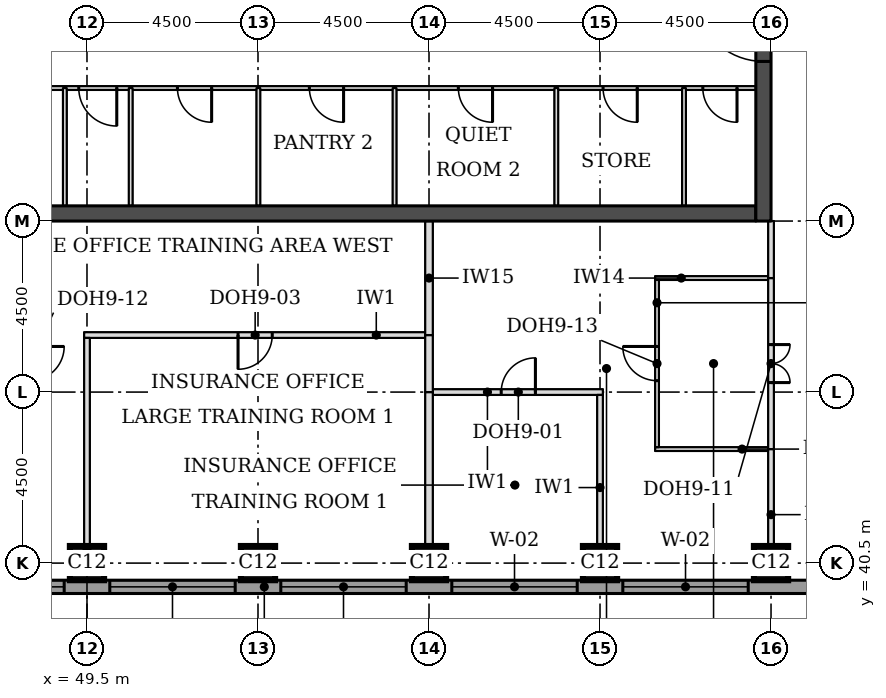
"""IFC4 building model, lengths in metres.
Left out: names, types, materials, properties, quantities, classifications, styles, units other than length and angle.
Written with IfcOpenShell. Run it as: python <this file> out.ifc"""

import sys

from ifc_helpers import new_model, si_unit, direction, frame, frame_2d, origin, origin_2d, place, context, subcontext, project, spatial, rectangle, extrude, element, fill, save


model = new_model("IFC4")
c1 = context("Model", 3, precision=1e-05, world=origin(), true_north=direction((0.0, 1.0)))
c2 = subcontext(c1, "Body", "Model", "MODEL_VIEW")
j1 = project(units=[si_unit("LENGTHUNIT", "METRE"), si_unit("PLANEANGLEUNIT", "RADIAN")], contexts=[c1])
p1 = place(None, origin())
s1 = spatial("IfcSite", under=j1, at=p1, CompositionType="ELEMENT")
p2 = place(p1, origin())
s2 = spatial("IfcBuilding", under=s1, at=p2, CompositionType="ELEMENT")
p3 = place(p2, frame((0.0, 0.0, 211.9)))
s3 = spatial("IfcBuildingStorey", under=s2, at=p3, CompositionType="ELEMENT", Elevation=211.9)
for number, where, z_axis, x_axis in (
    (1, (49.5, 40.5, 0.0), (0.0, 0.0, 1.0), (1.0, 0.0, 0.0)),
    (2, (54.0, 40.5, 0.0), (0.0, 0.0, 1.0), (1.0, 0.0, 0.0)),
    (3, (58.5, 40.5, 0.0), (0.0, 0.0, 1.0), (1.0, 0.0, 0.0)),
    (4, (63.0, 40.5, 0.0), (0.0, 0.0, 1.0), (1.0, 0.0, 0.0)),
    (5, (67.5, 40.5, 0.0), (0.0, 0.0, 1.0), (1.0, 0.0, 0.0)),
):
    element("IfcColumn", number, at=place(p3, frame(where, z_axis=z_axis, x_axis=x_axis)), inside=s3, PredefinedType="COLUMN", context=c2, shape_type="SweptSolid", body=[
        extrude(rectangle(XDim=0.9, YDim=0.9, at=origin_2d()), origin(), (0.0, 0.0, 1.0), 3.7),
    ])
p4 = place(p3, frame((45.4, 49.7, 0.0), z_axis=(0.0, 0.0, 1.0), x_axis=(1.0, 0.0, 0.0)))
e6 = element("IfcWall", 6, at=p4, inside=s3, PredefinedType="SHEAR", context=c2, shape_type="SweptSolid", body=[
    extrude(rectangle(XDim=21.7, YDim=0.4, at=frame_2d((10.85, 0.0))), origin(), (0.0, 0.0, 1.0), 3.7),
])
p5 = place(p3, frame((67.3, 49.5, 0.0), z_axis=(0.0, 0.0, 1.0), x_axis=(0.0, 1.0, 0.0)))
e7 = element("IfcWall", 7, at=p5, inside=s3, PredefinedType="SHEAR", context=c2, shape_type="SweptSolid", body=[
    extrude(rectangle(XDim=22.5, YDim=0.4, at=frame_2d((11.25, 0.0))), origin(), (0.0, 0.0, 1.0), 3.7),
])
p6 = place(p5, frame((4.2, 0.0, 0.0)))
e8 = element("IfcOpeningElement", 8, at=p6, cuts=e7, PredefinedType="OPENING", context=c2, shape_type="SweptSolid", body=[
    extrude(rectangle(XDim=1.8, YDim=2.1, at=frame_2d((0.9, 1.05))), frame((0.0, 0.21, 0.0), z_axis=(0.0, -1.0, 0.0), x_axis=(1.0, 0.0, 0.0)), (0.0, 0.0, 1.0), 0.42),
])
p7 = place(p5, frame((6.9, 0.0, 0.0)))
e9 = element("IfcOpeningElement", 9, at=p7, cuts=e7, PredefinedType="OPENING", context=c2, shape_type="SweptSolid", body=[
    extrude(rectangle(XDim=1.1, YDim=2.1, at=frame_2d((0.55, 1.05))), frame((0.0, 0.21, 0.0), z_axis=(0.0, -1.0, 0.0), x_axis=(1.0, 0.0, 0.0)), (0.0, 0.0, 1.0), 0.42),
])
p8 = place(p5, frame((13.6, 0.0, 0.0)))
e10 = element("IfcOpeningElement", 10, at=p8, cuts=e7, PredefinedType="OPENING", context=c2, shape_type="SweptSolid", body=[
    extrude(rectangle(XDim=1.1, YDim=2.1, at=frame_2d((0.55, 1.05))), frame((0.0, 0.21, 0.0), z_axis=(0.0, -1.0, 0.0), x_axis=(1.0, 0.0, 0.0)), (0.0, 0.0, 1.0), 0.42),
])
p9 = place(p5, frame((16.5, 0.0, 0.0)))
e11 = element("IfcOpeningElement", 11, at=p9, cuts=e7, PredefinedType="OPENING", context=c2, shape_type="SweptSolid", body=[
    extrude(rectangle(XDim=1.8, YDim=2.1, at=frame_2d((0.9, 1.05))), frame((0.0, 0.21, 0.0), z_axis=(0.0, -1.0, 0.0), x_axis=(1.0, 0.0, 0.0)), (0.0, 0.0, 1.0), 0.42),
])
p10 = place(p3, frame((36.0, 39.875, 0.0), z_axis=(0.0, 0.0, 1.0), x_axis=(1.0, 0.0, 0.0)))
e12 = element("IfcWall", 12, at=p10, inside=s3, PredefinedType="STANDARD", context=c2, shape_type="SweptSolid", body=[
    extrude(rectangle(XDim=36.331, YDim=0.35, at=frame_2d((18.166, 0.0))), origin(), (0.0, 0.0, 1.0), 3.525),
])
p11 = place(p10, frame((5.1, 0.0, 0.9)))
e13 = element("IfcOpeningElement", 13, at=p11, cuts=e12, PredefinedType="OPENING", context=c2, shape_type="SweptSolid", body=[
    extrude(rectangle(XDim=3.3, YDim=1.9, at=frame_2d((1.65, 0.95))), frame((0.0, 0.185, 0.0), z_axis=(0.0, -1.0, 0.0), x_axis=(1.0, 0.0, 0.0)), (0.0, 0.0, 1.0), 0.37),
])
p12 = place(p10, frame((9.6, 0.0, 0.9)))
e14 = element("IfcOpeningElement", 14, at=p12, cuts=e12, PredefinedType="OPENING", context=c2, shape_type="SweptSolid", body=[
    extrude(rectangle(XDim=3.3, YDim=1.9, at=frame_2d((1.65, 0.95))), frame((0.0, 0.185, 0.0), z_axis=(0.0, -1.0, 0.0), x_axis=(1.0, 0.0, 0.0)), (0.0, 0.0, 1.0), 0.37),
])
p13 = place(p10, frame((14.1, 0.0, 0.9)))
e15 = element("IfcOpeningElement", 15, at=p13, cuts=e12, PredefinedType="OPENING", context=c2, shape_type="SweptSolid", body=[
    extrude(rectangle(XDim=3.3, YDim=1.9, at=frame_2d((1.65, 0.95))), frame((0.0, 0.185, 0.0), z_axis=(0.0, -1.0, 0.0), x_axis=(1.0, 0.0, 0.0)), (0.0, 0.0, 1.0), 0.37),
])
p14 = place(p10, frame((18.6, 0.0, 0.9)))
e16 = element("IfcOpeningElement", 16, at=p14, cuts=e12, PredefinedType="OPENING", context=c2, shape_type="SweptSolid", body=[
    extrude(rectangle(XDim=3.3, YDim=1.9, at=frame_2d((1.65, 0.95))), frame((0.0, 0.185, 0.0), z_axis=(0.0, -1.0, 0.0), x_axis=(1.0, 0.0, 0.0)), (0.0, 0.0, 1.0), 0.37),
])
p15 = place(p10, frame((23.1, 0.0, 0.9)))
e17 = element("IfcOpeningElement", 17, at=p15, cuts=e12, PredefinedType="OPENING", context=c2, shape_type="SweptSolid", body=[
    extrude(rectangle(XDim=3.3, YDim=1.9, at=frame_2d((1.65, 0.95))), frame((0.0, 0.185, 0.0), z_axis=(0.0, -1.0, 0.0), x_axis=(1.0, 0.0, 0.0)), (0.0, 0.0, 1.0), 0.37),
])
p16 = place(p10, frame((27.6, 0.0, 0.9)))
e18 = element("IfcOpeningElement", 18, at=p16, cuts=e12, PredefinedType="OPENING", context=c2, shape_type="SweptSolid", body=[
    extrude(rectangle(XDim=3.3, YDim=1.9, at=frame_2d((1.65, 0.95))), frame((0.0, 0.185, 0.0), z_axis=(0.0, -1.0, 0.0), x_axis=(1.0, 0.0, 0.0)), (0.0, 0.0, 1.0), 0.37),
])
p17 = place(p3, frame((64.45, 43.5, 0.0), z_axis=(0.0, 0.0, 1.0), x_axis=(1.0, 0.0, 0.0)))
e19 = element("IfcWall", 19, at=p17, inside=s3, PredefinedType="PARTITIONING", context=c2, shape_type="SweptSolid", body=[
    extrude(rectangle(XDim=2.975, YDim=0.1, at=frame_2d((1.488, 0.0))), origin(), (0.0, 0.0, 1.0), 3.55),
])
p18 = place(p3, frame((58.6, 45.0, 0.0), z_axis=(0.0, 0.0, 1.0), x_axis=(1.0, 0.0, 0.0)))
e20 = element("IfcWall", 20, at=p18, inside=s3, PredefinedType="PARTITIONING", context=c2, shape_type="SweptSolid", body=[
    extrude(rectangle(XDim=4.475, YDim=0.15, at=frame_2d((2.237, 0.0))), origin(), (0.0, 0.0, 1.0), 3.55),
])
p19 = place(p18, frame((1.8, 0.0, 0.0)))
e21 = element("IfcOpeningElement", 21, at=p19, cuts=e20, PredefinedType="OPENING", context=c2, shape_type="SweptSolid", body=[
    extrude(rectangle(XDim=0.9, YDim=2.1, at=frame_2d((0.45, 1.05))), frame((0.0, 0.085, 0.0), z_axis=(0.0, -1.0, 0.0), x_axis=(1.0, 0.0, 0.0)), (0.0, 0.0, 1.0), 0.17),
])
p20 = place(p3, frame((49.425, 46.5, 0.0), z_axis=(0.0, 0.0, 1.0), x_axis=(1.0, 0.0, 0.0)))
e22 = element("IfcWall", 22, at=p20, inside=s3, PredefinedType="PARTITIONING", context=c2, shape_type="SweptSolid", body=[
    extrude(rectangle(XDim=8.975, YDim=0.15, at=frame_2d((4.487, 0.0))), origin(), (0.0, 0.0, 1.0), 3.55),
])
p21 = place(p20, frame((4.05, 0.0, 0.0)))
e23 = element("IfcOpeningElement", 23, at=p21, cuts=e22, PredefinedType="OPENING", context=c2, shape_type="SweptSolid", body=[
    extrude(rectangle(XDim=0.9, YDim=2.1, at=frame_2d((0.45, 1.05))), frame((0.0, 0.085, 0.0), z_axis=(0.0, -1.0, 0.0), x_axis=(1.0, 0.0, 0.0)), (0.0, 0.0, 1.0), 0.17),
])
p22 = place(p3, frame((64.45, 48.0, 0.0), z_axis=(0.0, 0.0, 1.0), x_axis=(1.0, 0.0, 0.0)))
e24 = element("IfcWall", 24, at=p22, inside=s3, PredefinedType="PARTITIONING", context=c2, shape_type="SweptSolid", body=[
    extrude(rectangle(XDim=2.975, YDim=0.1, at=frame_2d((1.488, 0.0))), origin(), (0.0, 0.0, 1.0), 3.55),
])
p23 = place(p3, frame((49.5, 40.05, 0.0), z_axis=(0.0, 0.0, 1.0), x_axis=(0.0, 1.0, 0.0)))
e25 = element("IfcWall", 25, at=p23, inside=s3, PredefinedType="PARTITIONING", context=c2, shape_type="SweptSolid", body=[
    extrude(rectangle(XDim=6.375, YDim=0.15, at=frame_2d((3.188, 0.0))), origin(), (0.0, 0.0, 1.0), 3.55),
])
p24 = place(p3, frame((58.5, 40.05, 0.0), z_axis=(0.0, 0.0, 1.0), x_axis=(0.0, 1.0, 0.0)))
e26 = element("IfcWall", 26, at=p24, inside=s3, PredefinedType="PARTITIONING", context=c2, shape_type="SweptSolid", body=[
    extrude(rectangle(XDim=4.95, YDim=0.2, at=frame_2d((2.475, 0.0))), origin(), (0.0, 0.0, 1.0), 3.55),
])
p25 = place(p3, frame((63.0, 40.05, 0.0), z_axis=(0.0, 0.0, 1.0), x_axis=(0.0, 1.0, 0.0)))
e27 = element("IfcWall", 27, at=p25, inside=s3, PredefinedType="PARTITIONING", context=c2, shape_type="SweptSolid", body=[
    extrude(rectangle(XDim=4.875, YDim=0.15, at=frame_2d((2.438, 0.0))), origin(), (0.0, 0.0, 1.0), 3.55),
])
p26 = place(p3, frame((67.5, 40.05, 0.0), z_axis=(0.0, 0.0, 1.0), x_axis=(0.0, 1.0, 0.0)))
e28 = element("IfcWall", 28, at=p26, inside=s3, PredefinedType="PARTITIONING", context=c2, shape_type="SweptSolid", body=[
    extrude(rectangle(XDim=3.45, YDim=0.15, at=frame_2d((1.725, 0.0))), origin(), (0.0, 0.0, 1.0), 3.022),
])
p27 = place(p3, frame((67.5, 43.5, 0.0), z_axis=(0.0, 0.0, 1.0), x_axis=(0.0, 1.0, 0.0)))
e29 = element("IfcWall", 29, at=p27, inside=s3, PredefinedType="PARTITIONING", context=c2, shape_type="SweptSolid", body=[
    extrude(rectangle(XDim=4.5, YDim=0.15, at=frame_2d((2.25, 0.0))), origin(), (0.0, 0.0, 1.0), 3.022),
])
p28 = place(p27, frame((1.75, 0.0, 0.0)))
e30 = element("IfcOpeningElement", 30, at=p28, cuts=e29, PredefinedType="OPENING", context=c2, shape_type="SweptSolid", body=[
    extrude(rectangle(XDim=1.0, YDim=2.1, at=frame_2d((0.5, 1.05))), frame((0.0, 0.085, 0.0), z_axis=(0.0, -1.0, 0.0), x_axis=(1.0, 0.0, 0.0)), (0.0, 0.0, 1.0), 0.17),
])
p29 = place(p3, frame((64.5, 43.55, 0.0), z_axis=(0.0, 0.0, 1.0), x_axis=(0.0, 1.0, 0.0)))
e31 = element("IfcWall", 31, at=p29, inside=s3, PredefinedType="PARTITIONING", context=c2, shape_type="SweptSolid", body=[
    extrude(rectangle(XDim=4.4, YDim=0.1, at=frame_2d((2.2, 0.0))), origin(), (0.0, 0.0, 1.0), 3.55),
])
p30 = place(p29, frame((1.75, 0.0, 0.0)))
e32 = element("IfcOpeningElement", 32, at=p30, cuts=e31, PredefinedType="OPENING", context=c2, shape_type="SweptSolid", body=[
    extrude(rectangle(XDim=0.9, YDim=2.1, at=frame_2d((0.45, 1.05))), frame((0.0, 0.06, 0.0), z_axis=(0.0, -1.0, 0.0), x_axis=(1.0, 0.0, 0.0)), (0.0, 0.0, 1.0), 0.12),
])
p31 = place(p3, frame((58.5, 45.0, 0.0), z_axis=(0.0, 0.0, 1.0), x_axis=(0.0, 1.0, 0.0)))
e33 = element("IfcWall", 33, at=p31, inside=s3, PredefinedType="PARTITIONING", context=c2, shape_type="SweptSolid", body=[
    extrude(rectangle(XDim=1.5, YDim=0.2, at=frame_2d((0.75, 0.0))), origin(), (0.0, 0.0, 1.0), 3.55),
])
p32 = place(p3, frame((58.5, 46.5, 0.0), z_axis=(0.0, 0.0, 1.0), x_axis=(0.0, 1.0, 0.0)))
e34 = element("IfcWall", 34, at=p32, inside=s3, PredefinedType="PARTITIONING", context=c2, shape_type="SweptSolid", body=[
    extrude(rectangle(XDim=3.0, YDim=0.2, at=frame_2d((1.5, 0.0))), origin(), (0.0, 0.0, 1.0), 3.55),
])
p33 = place(p3, frame((67.5, 48.0, 0.0), z_axis=(0.0, 0.0, 1.0), x_axis=(0.0, 1.0, 0.0)))
e35 = element("IfcWall", 35, at=p33, inside=s3, PredefinedType="PARTITIONING", context=c2, shape_type="SweptSolid", body=[
    extrude(rectangle(XDim=1.5, YDim=0.15, at=frame_2d((0.75, 0.0))), origin(), (0.0, 0.0, 1.0), 3.022),
])
p34 = place(p3, frame((45.4, 53.0, 0.0), z_axis=(0.0, 0.0, 1.0), x_axis=(1.0, 0.0, 0.0)))
e36 = element("IfcWall", 36, at=p34, inside=s3, PredefinedType="PARTITIONING", context=c2, shape_type="SweptSolid", body=[
    extrude(rectangle(XDim=21.7, YDim=0.1, at=frame_2d((10.85, 0.0))), origin(), (0.0, 0.0, 1.0), 3.55),
])
p35 = place(p34, frame((20.305, 0.0, 0.0)))
e37 = element("IfcOpeningElement", 37, at=p35, cuts=e36, PredefinedType="OPENING", context=c2, shape_type="SweptSolid", body=[
    extrude(rectangle(XDim=0.9, YDim=2.1, at=frame_2d((0.45, 1.05))), frame((0.0, 0.06, 0.0), z_axis=(0.0, -1.0, 0.0), x_axis=(1.0, 0.0, 0.0)), (0.0, 0.0, 1.0), 0.12),
])
p36 = place(p34, frame((17.68, 0.0, 0.0)))
e38 = element("IfcOpeningElement", 38, at=p36, cuts=e36, PredefinedType="OPENING", context=c2, shape_type="SweptSolid", body=[
    extrude(rectangle(XDim=0.9, YDim=2.1, at=frame_2d((0.45, 1.05))), frame((0.0, 0.06, 0.0), z_axis=(0.0, -1.0, 0.0), x_axis=(1.0, 0.0, 0.0)), (0.0, 0.0, 1.0), 0.12),
])
p37 = place(p34, frame((0.442, 0.0, 0.0)))
e39 = element("IfcOpeningElement", 39, at=p37, cuts=e36, PredefinedType="OPENING", context=c2, shape_type="SweptSolid", body=[
    extrude(rectangle(XDim=0.9, YDim=2.1, at=frame_2d((0.45, 1.05))), frame((0.0, 0.06, 0.0), z_axis=(0.0, -1.0, 0.0), x_axis=(1.0, 0.0, 0.0)), (0.0, 0.0, 1.0), 0.12),
])
p38 = place(p34, frame((2.201, 0.0, 0.0)))
e40 = element("IfcOpeningElement", 40, at=p38, cuts=e36, PredefinedType="OPENING", context=c2, shape_type="SweptSolid", body=[
    extrude(rectangle(XDim=0.9, YDim=2.1, at=frame_2d((0.45, 1.05))), frame((0.0, 0.06, 0.0), z_axis=(0.0, -1.0, 0.0), x_axis=(1.0, 0.0, 0.0)), (0.0, 0.0, 1.0), 0.12),
])
p39 = place(p34, frame((3.884, 0.0, 0.0)))
e41 = element("IfcOpeningElement", 41, at=p39, cuts=e36, PredefinedType="OPENING", context=c2, shape_type="SweptSolid", body=[
    extrude(rectangle(XDim=1.0, YDim=2.1, at=frame_2d((0.5, 1.05))), frame((0.0, 0.06, 0.0), z_axis=(0.0, -1.0, 0.0), x_axis=(1.0, 0.0, 0.0)), (0.0, 0.0, 1.0), 0.12),
])
p40 = place(p34, frame((6.48, 0.0, 0.0)))
e42 = element("IfcOpeningElement", 42, at=p40, cuts=e36, PredefinedType="OPENING", context=c2, shape_type="SweptSolid", body=[
    extrude(rectangle(XDim=0.9, YDim=2.1, at=frame_2d((0.45, 1.05))), frame((0.0, 0.06, 0.0), z_axis=(0.0, -1.0, 0.0), x_axis=(1.0, 0.0, 0.0)), (0.0, 0.0, 1.0), 0.12),
])
p41 = place(p34, frame((9.952, 0.0, 0.0)))
e43 = element("IfcOpeningElement", 43, at=p41, cuts=e36, PredefinedType="OPENING", context=c2, shape_type="SweptSolid", body=[
    extrude(rectangle(XDim=0.9, YDim=2.1, at=frame_2d((0.45, 1.05))), frame((0.0, 0.06, 0.0), z_axis=(0.0, -1.0, 0.0), x_axis=(1.0, 0.0, 0.0)), (0.0, 0.0, 1.0), 0.12),
])
p42 = place(p34, frame((13.872, 0.0, 0.0)))
e44 = element("IfcOpeningElement", 44, at=p42, cuts=e36, PredefinedType="OPENING", context=c2, shape_type="SweptSolid", body=[
    extrude(rectangle(XDim=0.9, YDim=2.1, at=frame_2d((0.45, 1.05))), frame((0.0, 0.06, 0.0), z_axis=(0.0, -1.0, 0.0), x_axis=(1.0, 0.0, 0.0)), (0.0, 0.0, 1.0), 0.12),
])
for number, where, z_axis, x_axis in (
    (45, (48.917, 49.9, 0.0), (0.0, 0.0, 1.0), (0.0, 1.0, 0.0)),
    (46, (50.65, 49.9, 0.0), (0.0, 0.0, 1.0), (0.0, 1.0, 0.0)),
    (47, (54.01, 49.9, 0.0), (0.0, 0.0, 1.0), (0.0, 1.0, 0.0)),
    (48, (57.594, 49.9, 0.0), (0.0, 0.0, 1.0), (0.0, 1.0, 0.0)),
    (49, (61.85, 49.9, 0.0), (0.0, 0.0, 1.0), (0.0, 1.0, 0.0)),
    (50, (65.21, 49.9, 0.0), (0.0, 0.0, 1.0), (0.0, 1.0, 0.0)),
):
    element("IfcWall", number, at=place(p3, frame(where, z_axis=z_axis, x_axis=x_axis)), inside=s3, PredefinedType="PARTITIONING", context=c2, shape_type="SweptSolid", body=[
        extrude(rectangle(XDim=3.1, YDim=0.1, at=frame_2d((1.55, 0.0))), origin(), (0.0, 0.0, 1.0), 3.55),
    ])
p43 = place(p12, origin())
e51 = element("IfcWindow", 51, at=p43, inside=s3, PartitioningType="SINGLE_PANEL", PredefinedType="WINDOW", context=c2, shape_type="SweptSolid", body=[
    extrude(rectangle(XDim=3.3, YDim=1.9, at=frame_2d((1.65, 0.95))), frame((0.0, 0.085, 0.0), z_axis=(0.0, -1.0, 0.0), x_axis=(1.0, 0.0, 0.0)), (0.0, 0.0, 1.0), 0.06),
])
fill(e14, e51)
p44 = place(p13, origin())
e52 = element("IfcWindow", 52, at=p44, inside=s3, PartitioningType="SINGLE_PANEL", PredefinedType="WINDOW", context=c2, shape_type="SweptSolid", body=[
    extrude(rectangle(XDim=3.3, YDim=1.9, at=frame_2d((1.65, 0.95))), frame((0.0, 0.085, 0.0), z_axis=(0.0, -1.0, 0.0), x_axis=(1.0, 0.0, 0.0)), (0.0, 0.0, 1.0), 0.06),
])
fill(e15, e52)
p45 = place(p14, origin())
e53 = element("IfcWindow", 53, at=p45, inside=s3, PartitioningType="SINGLE_PANEL", PredefinedType="WINDOW", context=c2, shape_type="SweptSolid", body=[
    extrude(rectangle(XDim=3.3, YDim=1.9, at=frame_2d((1.65, 0.95))), frame((0.0, 0.085, 0.0), z_axis=(0.0, -1.0, 0.0), x_axis=(1.0, 0.0, 0.0)), (0.0, 0.0, 1.0), 0.06),
])
fill(e16, e53)
p46 = place(p15, origin())
e54 = element("IfcWindow", 54, at=p46, inside=s3, PartitioningType="SINGLE_PANEL", PredefinedType="WINDOW", context=c2, shape_type="SweptSolid", body=[
    extrude(rectangle(XDim=3.3, YDim=1.9, at=frame_2d((1.65, 0.95))), frame((0.0, 0.085, 0.0), z_axis=(0.0, -1.0, 0.0), x_axis=(1.0, 0.0, 0.0)), (0.0, 0.0, 1.0), 0.06),
])
fill(e17, e54)
p47 = place(p16, origin())
e55 = element("IfcWindow", 55, at=p47, inside=s3, PartitioningType="SINGLE_PANEL", PredefinedType="WINDOW", context=c2, shape_type="SweptSolid", body=[
    extrude(rectangle(XDim=3.3, YDim=1.9, at=frame_2d((1.65, 0.95))), frame((0.0, 0.085, 0.0), z_axis=(0.0, -1.0, 0.0), x_axis=(1.0, 0.0, 0.0)), (0.0, 0.0, 1.0), 0.06),
])
fill(e18, e55)
p48 = place(p21, frame((0.9, 0.0, 0.0), z_axis=(0.0, 0.0, 1.0), x_axis=(-1.0, 0.0, 0.0)))
e56 = element("IfcDoor", 56, at=p48, inside=s3, OperationType="SINGLE_SWING_RIGHT", PredefinedType="DOOR", context=c2, shape_type="SweptSolid", body=[
    extrude(rectangle(XDim=0.9, YDim=2.1, at=frame_2d((0.45, 1.05))), frame((0.0, 0.025, 0.0), z_axis=(0.0, -1.0, 0.0), x_axis=(1.0, 0.0, 0.0)), (0.0, 0.0, 1.0), 0.05),
])
fill(e23, e56)
p49 = place(p28, frame((1.0, 0.0, 0.0), z_axis=(0.0, 0.0, 1.0), x_axis=(-1.0, 0.0, 0.0)))
e57 = element("IfcDoor", 57, at=p49, inside=s3, OperationType="DOUBLE_DOOR_SINGLE_SWING", PredefinedType="DOOR", context=c2, shape_type="SweptSolid", body=[
    extrude(rectangle(XDim=1.0, YDim=2.1, at=frame_2d((0.5, 1.05))), frame((0.0, 0.025, 0.0), z_axis=(0.0, -1.0, 0.0), x_axis=(1.0, 0.0, 0.0)), (0.0, 0.0, 1.0), 0.05),
])
fill(e30, e57)
p50 = place(p30, origin())
e58 = element("IfcDoor", 58, at=p50, inside=s3, OperationType="SINGLE_SWING_RIGHT", PredefinedType="DOOR", context=c2, shape_type="SweptSolid", body=[
    extrude(rectangle(XDim=0.9, YDim=2.1, at=frame_2d((0.45, 1.05))), frame((0.0, 0.025, 0.0), z_axis=(0.0, -1.0, 0.0), x_axis=(1.0, 0.0, 0.0)), (0.0, 0.0, 1.0), 0.05),
])
fill(e32, e58)
p51 = place(p19, origin())
e59 = element("IfcDoor", 59, at=p51, inside=s3, OperationType="SINGLE_SWING_RIGHT", PredefinedType="DOOR", context=c2, shape_type="SweptSolid", body=[
    extrude(rectangle(XDim=0.9, YDim=2.1, at=frame_2d((0.45, 1.05))), frame((0.0, 0.025, 0.0), z_axis=(0.0, -1.0, 0.0), x_axis=(1.0, 0.0, 0.0)), (0.0, 0.0, 1.0), 0.05),
])
fill(e21, e59)
p52 = place(p6, origin())
e60 = element("IfcDoor", 60, at=p52, inside=s3, OperationType="SINGLE_SWING_RIGHT", PredefinedType="DOOR", context=c2, shape_type="SweptSolid", body=[
    extrude(rectangle(XDim=1.8, YDim=2.1, at=frame_2d((0.9, 1.05))), frame((0.0, 0.025, 0.0), z_axis=(0.0, -1.0, 0.0), x_axis=(1.0, 0.0, 0.0)), (0.0, 0.0, 1.0), 0.05),
])
fill(e8, e60)
p53 = place(p35, frame((0.9, 0.0, 0.0), z_axis=(0.0, 0.0, 1.0), x_axis=(-1.0, 0.0, 0.0)))
e61 = element("IfcDoor", 61, at=p53, inside=s3, OperationType="SINGLE_SWING_LEFT", PredefinedType="DOOR", context=c2, shape_type="SweptSolid", body=[
    extrude(rectangle(XDim=0.9, YDim=2.1, at=frame_2d((0.45, 1.05))), frame((0.0, 0.025, 0.0), z_axis=(0.0, -1.0, 0.0), x_axis=(1.0, 0.0, 0.0)), (0.0, 0.0, 1.0), 0.05),
])
fill(e37, e61)
p54 = place(p36, frame((0.9, 0.0, 0.0), z_axis=(0.0, 0.0, 1.0), x_axis=(-1.0, 0.0, 0.0)))
e62 = element("IfcDoor", 62, at=p54, inside=s3, OperationType="SINGLE_SWING_LEFT", PredefinedType="DOOR", context=c2, shape_type="SweptSolid", body=[
    extrude(rectangle(XDim=0.9, YDim=2.1, at=frame_2d((0.45, 1.05))), frame((0.0, 0.025, 0.0), z_axis=(0.0, -1.0, 0.0), x_axis=(1.0, 0.0, 0.0)), (0.0, 0.0, 1.0), 0.05),
])
fill(e38, e62)
p55 = place(p39, frame((1.0, 0.0, 0.0), z_axis=(0.0, 0.0, 1.0), x_axis=(-1.0, 0.0, 0.0)))
e63 = element("IfcDoor", 63, at=p55, inside=s3, OperationType="SINGLE_SWING_LEFT", PredefinedType="DOOR", context=c2, shape_type="SweptSolid", body=[
    extrude(rectangle(XDim=1.0, YDim=2.1, at=frame_2d((0.5, 1.05))), frame((0.0, 0.025, 0.0), z_axis=(0.0, -1.0, 0.0), x_axis=(1.0, 0.0, 0.0)), (0.0, 0.0, 1.0), 0.05),
])
fill(e41, e63)
p56 = place(p40, frame((0.9, 0.0, 0.0), z_axis=(0.0, 0.0, 1.0), x_axis=(-1.0, 0.0, 0.0)))
e64 = element("IfcDoor", 64, at=p56, inside=s3, OperationType="SINGLE_SWING_LEFT", PredefinedType="DOOR", context=c2, shape_type="SweptSolid", body=[
    extrude(rectangle(XDim=0.9, YDim=2.1, at=frame_2d((0.45, 1.05))), frame((0.0, 0.025, 0.0), z_axis=(0.0, -1.0, 0.0), x_axis=(1.0, 0.0, 0.0)), (0.0, 0.0, 1.0), 0.05),
])
fill(e42, e64)
p57 = place(p41, frame((0.9, 0.0, 0.0), z_axis=(0.0, 0.0, 1.0), x_axis=(-1.0, 0.0, 0.0)))
e65 = element("IfcDoor", 65, at=p57, inside=s3, OperationType="SINGLE_SWING_LEFT", PredefinedType="DOOR", context=c2, shape_type="SweptSolid", body=[
    extrude(rectangle(XDim=0.9, YDim=2.1, at=frame_2d((0.45, 1.05))), frame((0.0, 0.025, 0.0), z_axis=(0.0, -1.0, 0.0), x_axis=(1.0, 0.0, 0.0)), (0.0, 0.0, 1.0), 0.05),
])
fill(e43, e65)
p58 = place(p42, frame((0.9, 0.0, 0.0), z_axis=(0.0, 0.0, 1.0), x_axis=(-1.0, 0.0, 0.0)))
e66 = element("IfcDoor", 66, at=p58, inside=s3, OperationType="SINGLE_SWING_LEFT", PredefinedType="DOOR", context=c2, shape_type="SweptSolid", body=[
    extrude(rectangle(XDim=0.9, YDim=2.1, at=frame_2d((0.45, 1.05))), frame((0.0, 0.025, 0.0), z_axis=(0.0, -1.0, 0.0), x_axis=(1.0, 0.0, 0.0)), (0.0, 0.0, 1.0), 0.05),
])
fill(e44, e66)
save(model, sys.argv[1])
